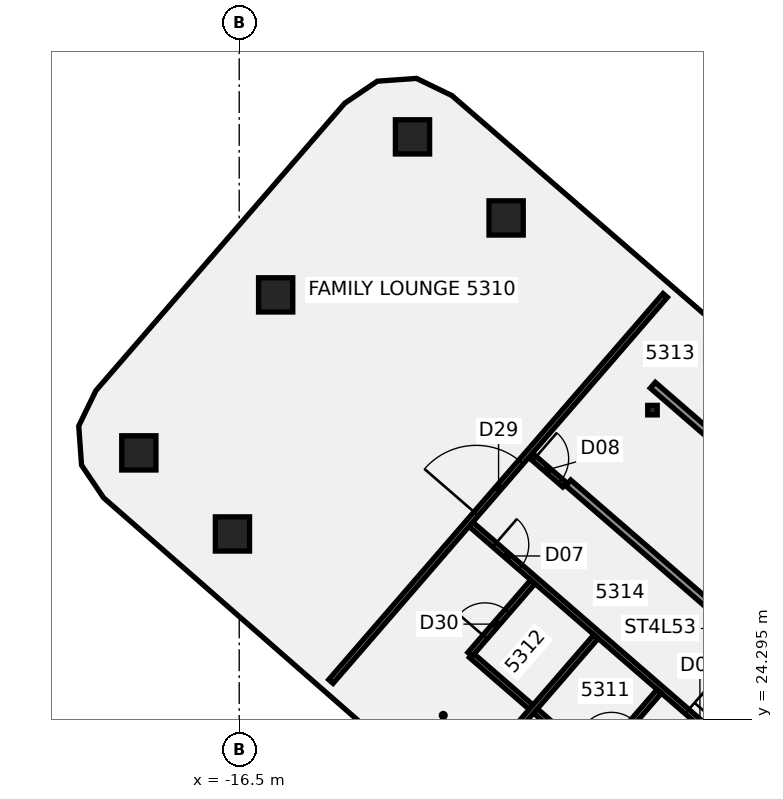
"""IFC4 building model, lengths in metres.
Left out: names, types, materials, properties, quantities, classifications, styles, units other than length and angle.
Written with IfcOpenShell. Run it as: python <this file> out.ifc"""

import sys

from ifc_helpers import new_model, si_unit, direction, frame, frame_2d, origin, origin_2d, place, context, subcontext, project, spatial, polyline, rectangle, outline, extrude, element, fill, save


model = new_model("IFC4")
c1 = context("Model", 3, precision=1e-05, world=origin(), true_north=direction((0.0, 1.0)))
c2 = subcontext(c1, "Body", "Model", "MODEL_VIEW")
j1 = project(units=[si_unit("LENGTHUNIT", "METRE"), si_unit("PLANEANGLEUNIT", "RADIAN")], contexts=[c1])
p1 = place(None, origin())
s1 = spatial("IfcSite", under=j1, at=p1, CompositionType="ELEMENT")
p2 = place(p1, origin())
s2 = spatial("IfcBuilding", under=s1, at=p2, CompositionType="ELEMENT")
p3 = place(p2, frame((0.0, 0.0, 211.3)))
s3 = spatial("IfcBuildingStorey", under=s2, at=p3, CompositionType="ELEMENT", Elevation=211.3)
for number, where, z_axis, x_axis in (
    (1, (-16.678, 29.168, -0.113), (0.0, 0.0, 1.0), (0.655, 0.756, 0.0)),
    (2, (-9.477, 37.483, -0.113), (0.0, 0.0, 1.0), (0.655, 0.756, 0.0)),
):
    element("IfcColumn", number, at=place(p3, frame(where, z_axis=z_axis, x_axis=x_axis)), inside=s3, PredefinedType="COLUMN", context=c2, shape_type="SweptSolid", body=[
        extrude(rectangle(XDim=0.9, YDim=0.9, at=origin_2d()), origin(), (0.0, 0.0, 1.0), 3.533),
    ])
p4 = place(p3, frame((-11.94, 39.616, -0.138), z_axis=(-0.026162103866, -0.114031159521, 0.993132639167), x_axis=(0.653408570418, 0.749921680043, 0.10331850708)))
e3 = element("IfcColumn", 3, at=p4, inside=s3, PredefinedType="COLUMN", context=c2, shape_type="SweptSolid", body=[
    extrude(rectangle(XDim=0.9, YDim=0.9, at=origin_2d()), origin(), (0.0, 0.0, 1.0), 3.565),
])
p5 = place(p3, frame((-15.541, 35.459, -0.138), z_axis=(-0.004851014042, -0.131933917115, 0.991246643968), x_axis=(0.654547521536, 0.748986420172, 0.102892586944)))
e4 = element("IfcColumn", 4, at=p5, inside=s3, PredefinedType="COLUMN", context=c2, shape_type="SweptSolid", body=[
    extrude(rectangle(XDim=0.9, YDim=0.9, at=origin_2d()), origin(), (0.0, 0.0, 1.0), 3.573),
])
p6 = place(p3, frame((-19.141, 31.301, -0.138), z_axis=(0.016414482341, -0.14956930797, 0.988614984148), x_axis=(0.655428916843, 0.748292653937, 0.102328095011)))
e5 = element("IfcColumn", 5, at=p6, inside=s3, PredefinedType="COLUMN", context=c2, shape_type="SweptSolid", body=[
    extrude(rectangle(XDim=0.9, YDim=0.9, at=origin_2d()), origin(), (0.0, 0.0, 1.0), 3.584),
])
p7 = place(p3, frame((-10.4, 29.421, 0.0), z_axis=(0.0, 0.0, 1.0), x_axis=(0.755729912983, -0.654883423689, 0.0)))
e6 = element("IfcWall", 6, at=p7, inside=s3, PredefinedType="PARTITIONING", context=c2, shape_type="SweptSolid", body=[
    extrude(rectangle(XDim=11.245, YDim=0.15, at=frame_2d((5.623, 0.0))), origin(), (0.0, 0.0, 1.0), 2.72),
])
p8 = place(p7, frame((9.97, 0.0, 0.0)))
e7 = element("IfcOpeningElement", 7, at=p8, cuts=e6, PredefinedType="OPENING", context=c2, shape_type="SweptSolid", body=[
    extrude(rectangle(XDim=1.0, YDim=2.1, at=frame_2d((0.5, 1.05))), frame((0.0, 0.085, 0.0), z_axis=(0.0, -1.0, 0.0), x_axis=(1.0, 0.0, 0.0)), (0.0, 0.0, 1.0), 0.17),
])
p9 = place(p7, frame((7.52, 0.0, 0.0)))
e8 = element("IfcOpeningElement", 8, at=p9, cuts=e6, PredefinedType="OPENING", context=c2, shape_type="SweptSolid", body=[
    extrude(rectangle(XDim=0.9, YDim=2.1, at=frame_2d((0.45, 1.05))), frame((0.0, 0.085, 0.0), z_axis=(0.0, -1.0, 0.0), x_axis=(1.0, 0.0, 0.0)), (0.0, 0.0, 1.0), 0.17),
])
p10 = place(p7, frame((0.82, 0.0, 0.0)))
e9 = element("IfcOpeningElement", 9, at=p10, cuts=e6, PredefinedType="OPENING", context=c2, shape_type="SweptSolid", body=[
    extrude(rectangle(XDim=0.9, YDim=2.1, at=frame_2d((0.45, 1.05))), frame((0.0, 0.085, 0.0), z_axis=(0.0, -1.0, 0.0), x_axis=(1.0, 0.0, 0.0)), (0.0, 0.0, 1.0), 0.17),
])
p11 = place(p3, frame((-10.395, 25.976, 0.0), z_axis=(0.0, 0.0, 1.0), x_axis=(0.755739421536, -0.654872450739, 0.0)))
e10 = element("IfcWall", 10, at=p11, inside=s3, PredefinedType="PARTITIONING", context=c2, shape_type="SweptSolid", body=[
    extrude(rectangle(XDim=4.321, YDim=0.15, at=frame_2d((2.16, 0.0))), origin(), (0.0, 0.0, 1.0), 2.824),
])
p12 = place(p3, frame((-8.83, 31.235, 0.0), z_axis=(0.0, 0.0, 1.0), x_axis=(0.755873338464, -0.654717875271, 0.0)))
e11 = element("IfcWall", 11, at=p12, inside=s3, PredefinedType="PARTITIONING", context=c2, shape_type="SweptSolid", body=[
    extrude(rectangle(XDim=1.18, YDim=0.15, at=frame_2d((0.59, 0.0))), origin(), (0.0, 0.0, 1.0), 2.72),
])
p13 = place(p12, frame((0.13, 0.0, 0.0)))
e12 = element("IfcOpeningElement", 12, at=p13, cuts=e11, PredefinedType="OPENING", context=c2, shape_type="SweptSolid", body=[
    extrude(rectangle(XDim=0.9, YDim=2.1, at=frame_2d((0.45, 1.05))), frame((0.0, 0.085, 0.0), z_axis=(0.0, -1.0, 0.0), x_axis=(1.0, 0.0, 0.0)), (0.0, 0.0, 1.0), 0.17),
])
p14 = place(p3, frame((-14.087, 25.286, 0.0), z_axis=(0.0, 0.0, 1.0), x_axis=(0.654652415454, 0.755930033099, 0.0)))
e13 = element("IfcWall", 13, at=p14, inside=s3, PredefinedType="PARTITIONING", context=c2, shape_type="SweptSolid", body=[
    extrude(rectangle(XDim=13.437, YDim=0.15, at=frame_2d((6.718, 0.0))), origin(), (0.0, 0.0, 1.0), 2.82),
])
p15 = place(p14, frame((5.838, 0.0, 0.0)))
e14 = element("IfcOpeningElement", 14, at=p15, cuts=e13, PredefinedType="OPENING", context=c2, shape_type="SweptSolid", body=[
    extrude(rectangle(XDim=1.8, YDim=2.1, at=frame_2d((0.9, 1.05))), frame((0.0, 0.085, 0.0), z_axis=(0.0, -1.0, 0.0), x_axis=(1.0, 0.0, 0.0)), (0.0, 0.0, 1.0), 0.17),
])
p16 = place(p3, frame((-9.573, 23.625, 0.0), z_axis=(0.0, 0.0, 1.0), x_axis=(0.654735179683, 0.755858349484, 0.0)))
e15 = element("IfcWall", 15, at=p16, inside=s3, PredefinedType="PARTITIONING", context=c2, shape_type="SweptSolid", body=[
    extrude(rectangle(XDim=3.759, YDim=0.15, at=frame_2d((1.879, 0.0))), origin(), (0.0, 0.0, 1.0), 2.82),
])
p17 = place(p3, frame((-10.425, 26.002, 0.0), z_axis=(0.0, 0.0, 1.0), x_axis=(0.65471655717, 0.755874480167, 0.0)))
e16 = element("IfcWall", 16, at=p17, inside=s3, PredefinedType="PARTITIONING", context=c2, shape_type="SweptSolid", body=[
    extrude(rectangle(XDim=2.52, YDim=0.15, at=frame_2d((1.26, 0.0))), origin(), (0.0, 0.0, 1.0), 2.82),
])
p18 = place(p17, frame((0.6, 0.0, 0.0)))
e17 = element("IfcOpeningElement", 17, at=p18, cuts=e16, PredefinedType="OPENING", context=c2, shape_type="SweptSolid", body=[
    extrude(rectangle(XDim=0.9, YDim=2.1, at=frame_2d((0.45, 1.05))), frame((0.0, 0.085, 0.0), z_axis=(0.0, -1.0, 0.0), x_axis=(1.0, 0.0, 0.0)), (0.0, 0.0, 1.0), 0.17),
])
p19 = place(p3, frame((-7.099, 23.121, 0.0), z_axis=(0.0, 0.0, 1.0), x_axis=(0.654764510889, 0.755832941384, 0.0)))
e18 = element("IfcWall", 18, at=p19, inside=s3, PredefinedType="PARTITIONING", context=c2, shape_type="SweptSolid", body=[
    extrude(rectangle(XDim=2.52, YDim=0.15, at=frame_2d((1.26, 0.0))), origin(), (0.0, 0.0, 1.0), 2.82),
])
p20 = place(p19, frame((0.6, 0.0, 0.0)))
e19 = element("IfcOpeningElement", 19, at=p20, cuts=e18, PredefinedType="OPENING", context=c2, shape_type="SweptSolid", body=[
    extrude(rectangle(XDim=0.9, YDim=2.1, at=frame_2d((0.45, 1.05))), frame((0.0, 0.085, 0.0), z_axis=(0.0, -1.0, 0.0), x_axis=(1.0, 0.0, 0.0)), (0.0, 0.0, 1.0), 0.17),
])
p21 = place(p3, frame((-2.777, 26.125, -0.14), z_axis=(0.0, 0.0, 1.0), x_axis=(-0.755905449716, 0.654680800918, 0.0)))
e20 = element("IfcWall", 20, at=p21, inside=s3, PredefinedType="SHEAR", context=c2, shape_type="SweptSolid", body=[
    extrude(rectangle(XDim=6.7, YDim=0.2, at=frame_2d((3.35, 0.0))), origin(), (0.0, 0.0, 1.0), 2.86),
])
p22 = place(p21, frame((0.35, 0.0, 0.0)))
e21 = element("IfcOpeningElement", 21, at=p22, cuts=e20, PredefinedType="OPENING", context=c2, shape_type="SweptSolid", body=[
    extrude(rectangle(XDim=1.0, YDim=2.1, at=frame_2d((0.5, 1.05))), frame((0.0, 0.11, 0.0), z_axis=(0.0, -1.0, 0.0), x_axis=(1.0, 0.0, 0.0)), (0.0, 0.0, 1.0), 0.22),
])
p23 = place(p3, frame((-0.552, 28.695, -0.14), z_axis=(0.0, 0.0, 1.0), x_axis=(-0.755923482159, 0.654659979777, 0.0)))
e22 = element("IfcWall", 22, at=p23, inside=s3, PredefinedType="SHEAR", context=c2, shape_type="SweptSolid", body=[
    extrude(rectangle(XDim=6.7, YDim=0.2, at=frame_2d((3.35, 0.0))), origin(), (0.0, 0.0, 1.0), 2.86),
])
p24 = place(p3, frame((0.0, 0.0, -0.14)))
e23 = element("IfcWall", 23, at=p24, inside=s3, PredefinedType="SHEAR", context=c2, shape_type="SweptSolid", body=[
    extrude(outline(polyline([(-5.531, 32.875), (-5.682, 33.006), (-7.777, 30.587), (-7.625, 30.456), (-5.531, 32.875)])), origin(), (0.0, 0.0, 1.0), 2.86),
])
p25 = place(p3, frame((-5.626, 32.427, 1.8), z_axis=(0.0, 0.0, 1.0), x_axis=(1.0, 0.0, 0.0)))
e24 = element("IfcColumn", 24, at=p25, inside=s3, PredefinedType="COLUMN", context=c2, shape_type="SweptSolid", body=[
    extrude(rectangle(XDim=0.25, YDim=0.25, at=origin_2d()), origin(), (0.0, 0.0, 1.0), 1.62),
])
p26 = place(p9, frame((0.9, 0.0, 0.0), z_axis=(0.0, 0.0, 1.0), x_axis=(-1.0, 0.0, 0.0)))
e25 = element("IfcDoor", 25, at=p26, inside=s3, OperationType="SINGLE_SWING_RIGHT", PredefinedType="DOOR", context=c2, shape_type="SweptSolid", body=[
    extrude(rectangle(XDim=0.9, YDim=2.1, at=frame_2d((0.45, 1.05))), frame((0.0, 0.025, 0.0), z_axis=(0.0, -1.0, 0.0), x_axis=(1.0, 0.0, 0.0)), (0.0, 0.0, 1.0), 0.05),
])
fill(e8, e25)
p27 = place(p10, frame((0.9, 0.0, 0.0), z_axis=(0.0, 0.0, 1.0), x_axis=(-1.0, 0.0, 0.0)))
e26 = element("IfcDoor", 26, at=p27, inside=s3, OperationType="SINGLE_SWING_LEFT", PredefinedType="DOOR", context=c2, shape_type="SweptSolid", body=[
    extrude(rectangle(XDim=0.9, YDim=2.1, at=frame_2d((0.45, 1.05))), frame((0.0, 0.025, 0.0), z_axis=(0.0, -1.0, 0.0), x_axis=(1.0, 0.0, 0.0)), (0.0, 0.0, 1.0), 0.05),
])
fill(e9, e26)
p28 = place(p13, origin())
e27 = element("IfcDoor", 27, at=p28, inside=s3, OperationType="SINGLE_SWING_RIGHT", PredefinedType="DOOR", context=c2, shape_type="SweptSolid", body=[
    extrude(rectangle(XDim=0.9, YDim=2.1, at=frame_2d((0.45, 1.05))), frame((0.0, 0.025, 0.0), z_axis=(0.0, -1.0, 0.0), x_axis=(1.0, 0.0, 0.0)), (0.0, 0.0, 1.0), 0.05),
])
fill(e12, e27)
p29 = place(p15, origin())
e28 = element("IfcDoor", 28, at=p29, inside=s3, OperationType="DOUBLE_DOOR_SINGLE_SWING", PredefinedType="DOOR", context=c2, shape_type="SweptSolid", body=[
    extrude(rectangle(XDim=1.8, YDim=2.1, at=frame_2d((0.9, 1.05))), frame((0.0, 0.025, 0.0), z_axis=(0.0, -1.0, 0.0), x_axis=(1.0, 0.0, 0.0)), (0.0, 0.0, 1.0), 0.05),
])
fill(e14, e28)
p30 = place(p18, frame((0.9, 0.0, 0.0), z_axis=(0.0, 0.0, 1.0), x_axis=(-1.0, 0.0, 0.0)))
e29 = element("IfcDoor", 29, at=p30, inside=s3, OperationType="SINGLE_SWING_LEFT", PredefinedType="DOOR", context=c2, shape_type="SweptSolid", body=[
    extrude(rectangle(XDim=0.9, YDim=2.1, at=frame_2d((0.45, 1.05))), frame((0.0, 0.025, 0.0), z_axis=(0.0, -1.0, 0.0), x_axis=(1.0, 0.0, 0.0)), (0.0, 0.0, 1.0), 0.05),
])
fill(e17, e29)
save(model, sys.argv[1])
